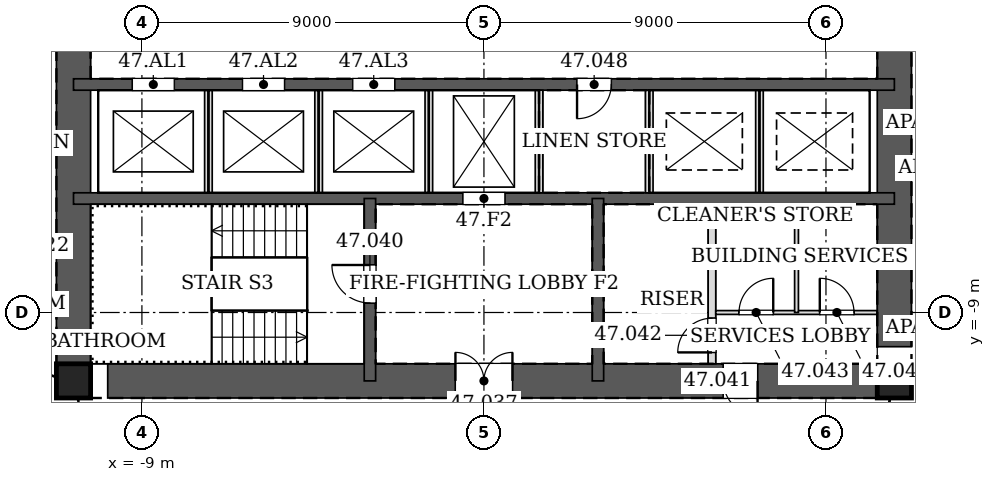
"""IFC4 building model, lengths in metres.
Left out: names, types, materials, properties, quantities, classifications, styles, units other than length and angle.
Written with IfcOpenShell. Run it as: python <this file> out.ifc"""

import sys

from ifc_helpers import new_model, si_unit, direction, frame, frame_2d, origin, origin_2d, place, context, subcontext, project, spatial, rectangle, hollow_rectangle, extrude, element, fill, save


model = new_model("IFC4")
c1 = context("Model", 3, precision=1e-05, world=origin(), true_north=direction((0.0, 1.0)))
c2 = subcontext(c1, "Body", "Model", "MODEL_VIEW")
j1 = project(units=[si_unit("LENGTHUNIT", "METRE"), si_unit("PLANEANGLEUNIT", "RADIAN")], contexts=[c1])
p1 = place(None, origin())
s1 = spatial("IfcSite", under=j1, at=p1, CompositionType="ELEMENT")
p2 = place(p1, origin())
s2 = spatial("IfcBuilding", under=s1, at=p2, CompositionType="ELEMENT")
p3 = place(p2, frame((0.0, 0.0, 207.4)))
s3 = spatial("IfcBuildingStorey", under=s2, at=p3, CompositionType="ELEMENT", Elevation=207.4)
for number, where, z_axis, x_axis in (
    (1, (-10.8, -10.8, 0.0), (0.0, 0.0, 1.0), (1.0, 0.0, 0.0)),
    (2, (10.8, -10.8, 0.0), (0.0, 0.0, 1.0), (1.0, 0.0, 0.0)),
):
    element("IfcColumn", number, at=place(p3, frame(where, z_axis=z_axis, x_axis=x_axis)), inside=s3, PredefinedType="COLUMN", context=c2, shape_type="SweptSolid", body=[
        extrude(hollow_rectangle(XDim=0.9, YDim=0.9, WallThickness=0.05, at=origin_2d()), origin(), (0.0, 0.0, 1.0), 3.4),
    ])
p4 = place(p3, frame((-10.8, -10.8, 0.0), z_axis=(0.0, 0.0, 1.0), x_axis=(1.0, 0.0, 0.0)))
e3 = element("IfcWall", 3, at=p4, inside=s3, PredefinedType="SOLIDWALL", context=c2, shape_type="SweptSolid", body=[
    extrude(rectangle(XDim=21.6, YDim=0.9, at=frame_2d((10.8, 0.0))), origin(), (0.0, 0.0, 1.0), 3.4),
])
p5 = place(p4, frame((10.05, 0.0, 0.0)))
e4 = element("IfcOpeningElement", 4, at=p5, cuts=e3, PredefinedType="OPENING", context=c2, shape_type="SweptSolid", body=[
    extrude(rectangle(XDim=1.5, YDim=2.1, at=frame_2d((0.75, 1.05))), frame((0.0, 0.46, 0.0), z_axis=(0.0, -1.0, 0.0), x_axis=(1.0, 0.0, 0.0)), (0.0, 0.0, 1.0), 0.92),
])
p6 = place(p4, frame((17.1, 0.0, 0.0)))
e5 = element("IfcOpeningElement", 5, at=p6, cuts=e3, PredefinedType="OPENING", context=c2, shape_type="SweptSolid", body=[
    extrude(rectangle(XDim=0.9, YDim=2.1, at=frame_2d((0.45, 1.05))), frame((0.0, 0.46, 0.0), z_axis=(0.0, -1.0, 0.0), x_axis=(1.0, 0.0, 0.0)), (0.0, 0.0, 1.0), 0.92),
])
p7 = place(p3, frame((10.8, -10.8, 0.0), z_axis=(0.0, 0.0, 1.0), x_axis=(0.0, 1.0, 0.0)))
e6 = element("IfcWall", 6, at=p7, inside=s3, PredefinedType="SOLIDWALL", context=c2, shape_type="SweptSolid", body=[
    extrude(rectangle(XDim=21.6, YDim=0.9, at=frame_2d((10.8, 0.0))), origin(), (0.0, 0.0, 1.0), 3.4),
])
p8 = place(p7, frame((11.7, 0.0, 0.0)))
e7 = element("IfcOpeningElement", 7, at=p8, cuts=e6, PredefinedType="OPENING", context=c2, shape_type="SweptSolid", body=[
    extrude(rectangle(XDim=1.2, YDim=2.1, at=frame_2d((0.6, 1.05))), frame((0.0, 0.46, 0.0), z_axis=(0.0, -1.0, 0.0), x_axis=(1.0, 0.0, 0.0)), (0.0, 0.0, 1.0), 0.92),
])
p9 = place(p7, frame((8.7, 0.0, 0.0)))
e8 = element("IfcOpeningElement", 8, at=p9, cuts=e6, PredefinedType="OPENING", context=c2, shape_type="SweptSolid", body=[
    extrude(rectangle(XDim=1.2, YDim=2.1, at=frame_2d((0.6, 1.05))), frame((0.0, 0.46, 0.0), z_axis=(0.0, -1.0, 0.0), x_axis=(1.0, 0.0, 0.0)), (0.0, 0.0, 1.0), 0.92),
])
p10 = place(p3, frame((-10.8, 10.8, 0.0), z_axis=(0.0, 0.0, 1.0), x_axis=(0.0, -1.0, 0.0)))
e9 = element("IfcWall", 9, at=p10, inside=s3, PredefinedType="SOLIDWALL", context=c2, shape_type="SweptSolid", body=[
    extrude(rectangle(XDim=21.6, YDim=0.9, at=frame_2d((10.8, 0.0))), origin(), (0.0, 0.0, 1.0), 3.4),
])
p11 = place(p10, frame((8.7, 0.0, 0.0)))
e10 = element("IfcOpeningElement", 10, at=p11, cuts=e9, PredefinedType="OPENING", context=c2, shape_type="SweptSolid", body=[
    extrude(rectangle(XDim=1.2, YDim=2.1, at=frame_2d((0.6, 1.05))), frame((0.0, 0.46, 0.0), z_axis=(0.0, -1.0, 0.0), x_axis=(1.0, 0.0, 0.0)), (0.0, 0.0, 1.0), 0.92),
])
p12 = place(p10, frame((11.7, 0.0, 0.0)))
e11 = element("IfcOpeningElement", 11, at=p12, cuts=e9, PredefinedType="OPENING", context=c2, shape_type="SweptSolid", body=[
    extrude(rectangle(XDim=1.2, YDim=2.1, at=frame_2d((0.6, 1.05))), frame((0.0, 0.46, 0.0), z_axis=(0.0, -1.0, 0.0), x_axis=(1.0, 0.0, 0.0)), (0.0, 0.0, 1.0), 0.92),
])
p13 = place(p3, frame((-10.8, -3.0, 0.0), z_axis=(0.0, 0.0, 1.0), x_axis=(1.0, 0.0, 0.0)))
e12 = element("IfcWall", 12, at=p13, inside=s3, PredefinedType="SOLIDWALL", context=c2, shape_type="SweptSolid", body=[
    extrude(rectangle(XDim=21.6, YDim=0.3, at=frame_2d((10.8, 0.0))), origin(), (0.0, 0.0, 1.0), 3.4),
])
p14 = place(p13, frame((13.25, 0.0, 0.0)))
e13 = element("IfcOpeningElement", 13, at=p14, cuts=e12, PredefinedType="OPENING", context=c2, shape_type="SweptSolid", body=[
    extrude(rectangle(XDim=0.9, YDim=2.1, at=frame_2d((0.45, 1.05))), frame((0.0, 0.16, 0.0), z_axis=(0.0, -1.0, 0.0), x_axis=(1.0, 0.0, 0.0)), (0.0, 0.0, 1.0), 0.32),
])
p15 = place(p13, frame((1.55, 0.0, 0.0)))
e14 = element("IfcOpeningElement", 14, at=p15, cuts=e12, PredefinedType="OPENING", context=c2, shape_type="SweptSolid", body=[
    extrude(rectangle(XDim=1.1, YDim=2.1, at=frame_2d((0.55, 1.05))), frame((0.0, 0.16, 0.0), z_axis=(0.0, -1.0, 0.0), x_axis=(1.0, 0.0, 0.0)), (0.0, 0.0, 1.0), 0.32),
])
p16 = place(p13, frame((4.45, 0.0, 0.0)))
e15 = element("IfcOpeningElement", 15, at=p16, cuts=e12, PredefinedType="OPENING", context=c2, shape_type="SweptSolid", body=[
    extrude(rectangle(XDim=1.1, YDim=2.1, at=frame_2d((0.55, 1.05))), frame((0.0, 0.16, 0.0), z_axis=(0.0, -1.0, 0.0), x_axis=(1.0, 0.0, 0.0)), (0.0, 0.0, 1.0), 0.32),
])
p17 = place(p13, frame((7.35, 0.0, 0.0)))
e16 = element("IfcOpeningElement", 16, at=p17, cuts=e12, PredefinedType="OPENING", context=c2, shape_type="SweptSolid", body=[
    extrude(rectangle(XDim=1.1, YDim=2.1, at=frame_2d((0.55, 1.05))), frame((0.0, 0.16, 0.0), z_axis=(0.0, -1.0, 0.0), x_axis=(1.0, 0.0, 0.0)), (0.0, 0.0, 1.0), 0.32),
])
p18 = place(p3, frame((-10.8, -6.0, 0.0), z_axis=(0.0, 0.0, 1.0), x_axis=(1.0, 0.0, 0.0)))
e17 = element("IfcWall", 17, at=p18, inside=s3, PredefinedType="SOLIDWALL", context=c2, shape_type="SweptSolid", body=[
    extrude(rectangle(XDim=21.6, YDim=0.3, at=frame_2d((10.8, 0.0))), origin(), (0.0, 0.0, 1.0), 3.4),
])
p19 = place(p18, frame((10.25, 0.0, 0.0)))
e18 = element("IfcOpeningElement", 18, at=p19, cuts=e17, PredefinedType="OPENING", context=c2, shape_type="SweptSolid", body=[
    extrude(rectangle(XDim=1.1, YDim=2.1, at=frame_2d((0.55, 1.05))), frame((0.0, 0.16, 0.0), z_axis=(0.0, -1.0, 0.0), x_axis=(1.0, 0.0, 0.0)), (0.0, 0.0, 1.0), 0.32),
])
p20 = place(p3, frame((-3.0, -6.0, 0.0), z_axis=(0.0, 0.0, 1.0), x_axis=(0.0, -1.0, 0.0)))
e19 = element("IfcWall", 19, at=p20, inside=s3, PredefinedType="SOLIDWALL", context=c2, shape_type="SweptSolid", body=[
    extrude(rectangle(XDim=4.8, YDim=0.3, at=frame_2d((2.4, 0.0))), origin(), (0.0, 0.0, 1.0), 3.4),
])
p21 = place(p20, frame((1.75, 0.0, 0.0)))
e20 = element("IfcOpeningElement", 20, at=p21, cuts=e19, PredefinedType="OPENING", context=c2, shape_type="SweptSolid", body=[
    extrude(rectangle(XDim=1.0, YDim=2.1, at=frame_2d((0.5, 1.05))), frame((0.0, 0.16, 0.0), z_axis=(0.0, -1.0, 0.0), x_axis=(1.0, 0.0, 0.0)), (0.0, 0.0, 1.0), 0.32),
])
p22 = place(p3, frame((3.0, -6.0, 0.0), z_axis=(0.0, 0.0, 1.0), x_axis=(0.0, -1.0, 0.0)))
e21 = element("IfcWall", 21, at=p22, inside=s3, PredefinedType="SOLIDWALL", context=c2, shape_type="SweptSolid", body=[
    extrude(rectangle(XDim=4.8, YDim=0.3, at=frame_2d((2.4, 0.0))), origin(), (0.0, 0.0, 1.0), 3.4),
])
for number, where, z_axis, x_axis in (
    (22, (-7.25, -5.85, 0.0), (0.0, 0.0, 1.0), (0.0, 1.0, 0.0)),
    (23, (-4.35, -5.85, 0.0), (0.0, 0.0, 1.0), (0.0, 1.0, 0.0)),
    (24, (-1.45, -5.85, 0.0), (0.0, 0.0, 1.0), (0.0, 1.0, 0.0)),
):
    element("IfcWall", number, at=place(p3, frame(where, z_axis=z_axis, x_axis=x_axis)), inside=s3, PredefinedType="PARTITIONING", context=c2, shape_type="SweptSolid", body=[
        extrude(rectangle(XDim=2.7, YDim=0.2, at=frame_2d((1.35, 0.0))), origin(), (0.0, 0.0, 1.0), 3.4),
    ])
for number, where, z_axis, x_axis in (
    (25, (1.45, -5.85, 0.0), (0.0, 0.0, 1.0), (0.0, 1.0, 0.0)),
    (26, (4.35, -5.85, 0.0), (0.0, 0.0, 1.0), (0.0, 1.0, 0.0)),
):
    element("IfcWall", number, at=place(p3, frame(where, z_axis=z_axis, x_axis=x_axis)), inside=s3, PredefinedType="PARTITIONING", context=c2, shape_type="SweptSolid", body=[
        extrude(rectangle(XDim=2.7, YDim=0.2, at=frame_2d((1.35, 0.0))), origin(), (0.0, 0.0, 1.0), 3.2),
    ])
p23 = place(p3, frame((7.25, -5.85, 0.0), z_axis=(0.0, 0.0, 1.0), x_axis=(0.0, 1.0, 0.0)))
e27 = element("IfcWall", 27, at=p23, inside=s3, PredefinedType="PARTITIONING", context=c2, shape_type="SweptSolid", body=[
    extrude(rectangle(XDim=2.7, YDim=0.2, at=frame_2d((1.35, 0.0))), origin(), (0.0, 0.0, 1.0), 3.4),
])
p24 = place(p3, frame((6.0, -10.35, 0.0), z_axis=(0.0, 0.0, 1.0), x_axis=(0.0, 1.0, 0.0)))
e28 = element("IfcWall", 28, at=p24, inside=s3, PredefinedType="PARTITIONING", context=c2, shape_type="SweptSolid", body=[
    extrude(rectangle(XDim=4.2, YDim=0.2, at=frame_2d((2.1, 0.0))), origin(), (0.0, 0.0, 1.0), 3.2),
])
p25 = place(p24, frame((0.3, 0.0, 0.0)))
e29 = element("IfcOpeningElement", 29, at=p25, cuts=e28, PredefinedType="OPENING", context=c2, shape_type="SweptSolid", body=[
    extrude(rectangle(XDim=0.9, YDim=2.1, at=frame_2d((0.45, 1.05))), frame((0.0, 0.11, 0.0), z_axis=(0.0, -1.0, 0.0), x_axis=(1.0, 0.0, 0.0)), (0.0, 0.0, 1.0), 0.22),
])
p26 = place(p3, frame((6.1, -9.0, 0.0), z_axis=(0.0, 0.0, 1.0), x_axis=(1.0, 0.0, 0.0)))
e30 = element("IfcWall", 30, at=p26, inside=s3, PredefinedType="PARTITIONING", context=c2, shape_type="SweptSolid", body=[
    extrude(rectangle(XDim=4.25, YDim=0.1, at=frame_2d((2.125, 0.0))), origin(), (0.0, 0.0, 1.0), 3.2),
])
p27 = place(p26, frame((0.613, 0.0, 0.0)))
e31 = element("IfcOpeningElement", 31, at=p27, cuts=e30, PredefinedType="OPENING", context=c2, shape_type="SweptSolid", body=[
    extrude(rectangle(XDim=0.9, YDim=2.1, at=frame_2d((0.45, 1.05))), frame((0.0, 0.06, 0.0), z_axis=(0.0, -1.0, 0.0), x_axis=(1.0, 0.0, 0.0)), (0.0, 0.0, 1.0), 0.12),
])
p28 = place(p26, frame((2.738, 0.0, 0.0)))
e32 = element("IfcOpeningElement", 32, at=p28, cuts=e30, PredefinedType="OPENING", context=c2, shape_type="SweptSolid", body=[
    extrude(rectangle(XDim=0.9, YDim=2.1, at=frame_2d((0.45, 1.05))), frame((0.0, 0.06, 0.0), z_axis=(0.0, -1.0, 0.0), x_axis=(1.0, 0.0, 0.0)), (0.0, 0.0, 1.0), 0.12),
])
p29 = place(p3, frame((8.225, -9.0, 0.0), z_axis=(0.0, 0.0, 1.0), x_axis=(0.0, 1.0, 0.0)))
e33 = element("IfcWall", 33, at=p29, inside=s3, PredefinedType="PARTITIONING", context=c2, shape_type="SweptSolid", body=[
    extrude(rectangle(XDim=2.85, YDim=0.1, at=frame_2d((1.425, 0.0))), origin(), (0.0, 0.0, 1.0), 3.2),
])
p30 = place(p5, origin())
e34 = element("IfcDoor", 34, at=p30, inside=s3, OperationType="DOUBLE_DOOR_SINGLE_SWING", PredefinedType="DOOR", context=c2, shape_type="SweptSolid", body=[
    extrude(rectangle(XDim=1.5, YDim=2.1, at=frame_2d((0.75, 1.05))), frame((0.0, 0.025, 0.0), z_axis=(0.0, -1.0, 0.0), x_axis=(1.0, 0.0, 0.0)), (0.0, 0.0, 1.0), 0.05),
])
fill(e4, e34)
p31 = place(p21, frame((1.0, 0.0, 0.0), z_axis=(0.0, 0.0, 1.0), x_axis=(-1.0, 0.0, 0.0)))
e35 = element("IfcDoor", 35, at=p31, inside=s3, OperationType="SINGLE_SWING_RIGHT", PredefinedType="DOOR", context=c2, shape_type="SweptSolid", body=[
    extrude(rectangle(XDim=1.0, YDim=2.1, at=frame_2d((0.5, 1.05))), frame((0.0, 0.025, 0.0), z_axis=(0.0, -1.0, 0.0), x_axis=(1.0, 0.0, 0.0)), (0.0, 0.0, 1.0), 0.05),
])
fill(e20, e35)
p32 = place(p6, frame((0.9, 0.0, 0.0), z_axis=(0.0, 0.0, 1.0), x_axis=(-1.0, 0.0, 0.0)))
e36 = element("IfcDoor", 36, at=p32, inside=s3, OperationType="SINGLE_SWING_LEFT", PredefinedType="DOOR", context=c2, shape_type="SweptSolid", body=[
    extrude(rectangle(XDim=0.9, YDim=2.1, at=frame_2d((0.45, 1.05))), frame((0.0, 0.025, 0.0), z_axis=(0.0, -1.0, 0.0), x_axis=(1.0, 0.0, 0.0)), (0.0, 0.0, 1.0), 0.05),
])
fill(e5, e36)
p33 = place(p25, origin())
e37 = element("IfcDoor", 37, at=p33, inside=s3, OperationType="SINGLE_SWING_LEFT", PredefinedType="DOOR", context=c2, shape_type="SweptSolid", body=[
    extrude(rectangle(XDim=0.9, YDim=2.1, at=frame_2d((0.45, 1.05))), frame((0.0, 0.025, 0.0), z_axis=(0.0, -1.0, 0.0), x_axis=(1.0, 0.0, 0.0)), (0.0, 0.0, 1.0), 0.05),
])
fill(e29, e37)
p34 = place(p27, origin())
e38 = element("IfcDoor", 38, at=p34, inside=s3, OperationType="SINGLE_SWING_RIGHT", PredefinedType="DOOR", context=c2, shape_type="SweptSolid", body=[
    extrude(rectangle(XDim=0.9, YDim=2.1, at=frame_2d((0.45, 1.05))), frame((0.0, 0.025, 0.0), z_axis=(0.0, -1.0, 0.0), x_axis=(1.0, 0.0, 0.0)), (0.0, 0.0, 1.0), 0.05),
])
fill(e31, e38)
p35 = place(p28, origin())
e39 = element("IfcDoor", 39, at=p35, inside=s3, OperationType="SINGLE_SWING_LEFT", PredefinedType="DOOR", context=c2, shape_type="SweptSolid", body=[
    extrude(rectangle(XDim=0.9, YDim=2.1, at=frame_2d((0.45, 1.05))), frame((0.0, 0.025, 0.0), z_axis=(0.0, -1.0, 0.0), x_axis=(1.0, 0.0, 0.0)), (0.0, 0.0, 1.0), 0.05),
])
fill(e32, e39)
p36 = place(p14, frame((0.9, 0.0, 0.0), z_axis=(0.0, 0.0, 1.0), x_axis=(-1.0, 0.0, 0.0)))
e40 = element("IfcDoor", 40, at=p36, inside=s3, OperationType="SINGLE_SWING_RIGHT", PredefinedType="DOOR", context=c2, shape_type="SweptSolid", body=[
    extrude(rectangle(XDim=0.9, YDim=2.1, at=frame_2d((0.45, 1.05))), frame((0.0, 0.025, 0.0), z_axis=(0.0, -1.0, 0.0), x_axis=(1.0, 0.0, 0.0)), (0.0, 0.0, 1.0), 0.05),
])
fill(e13, e40)
p37 = place(p19, origin())
e41 = element("IfcDoor", 41, at=p37, inside=s3, OperationType="DOUBLE_DOOR_SLIDING", PredefinedType="DOOR", context=c2, shape_type="SweptSolid", body=[
    extrude(rectangle(XDim=1.1, YDim=2.1, at=frame_2d((0.55, 1.05))), frame((0.0, 0.025, 0.0), z_axis=(0.0, -1.0, 0.0), x_axis=(1.0, 0.0, 0.0)), (0.0, 0.0, 1.0), 0.05),
])
fill(e18, e41)
p38 = place(p15, origin())
e42 = element("IfcDoor", 42, at=p38, inside=s3, OperationType="DOUBLE_DOOR_SLIDING", PredefinedType="DOOR", context=c2, shape_type="SweptSolid", body=[
    extrude(rectangle(XDim=1.1, YDim=2.1, at=frame_2d((0.55, 1.05))), frame((0.0, 0.025, 0.0), z_axis=(0.0, -1.0, 0.0), x_axis=(1.0, 0.0, 0.0)), (0.0, 0.0, 1.0), 0.05),
])
fill(e14, e42)
p39 = place(p16, origin())
e43 = element("IfcDoor", 43, at=p39, inside=s3, OperationType="DOUBLE_DOOR_SLIDING", PredefinedType="DOOR", context=c2, shape_type="SweptSolid", body=[
    extrude(rectangle(XDim=1.1, YDim=2.1, at=frame_2d((0.55, 1.05))), frame((0.0, 0.025, 0.0), z_axis=(0.0, -1.0, 0.0), x_axis=(1.0, 0.0, 0.0)), (0.0, 0.0, 1.0), 0.05),
])
fill(e15, e43)
p40 = place(p17, origin())
e44 = element("IfcDoor", 44, at=p40, inside=s3, OperationType="DOUBLE_DOOR_SLIDING", PredefinedType="DOOR", context=c2, shape_type="SweptSolid", body=[
    extrude(rectangle(XDim=1.1, YDim=2.1, at=frame_2d((0.55, 1.05))), frame((0.0, 0.025, 0.0), z_axis=(0.0, -1.0, 0.0), x_axis=(1.0, 0.0, 0.0)), (0.0, 0.0, 1.0), 0.05),
])
fill(e16, e44)
save(model, sys.argv[1])
